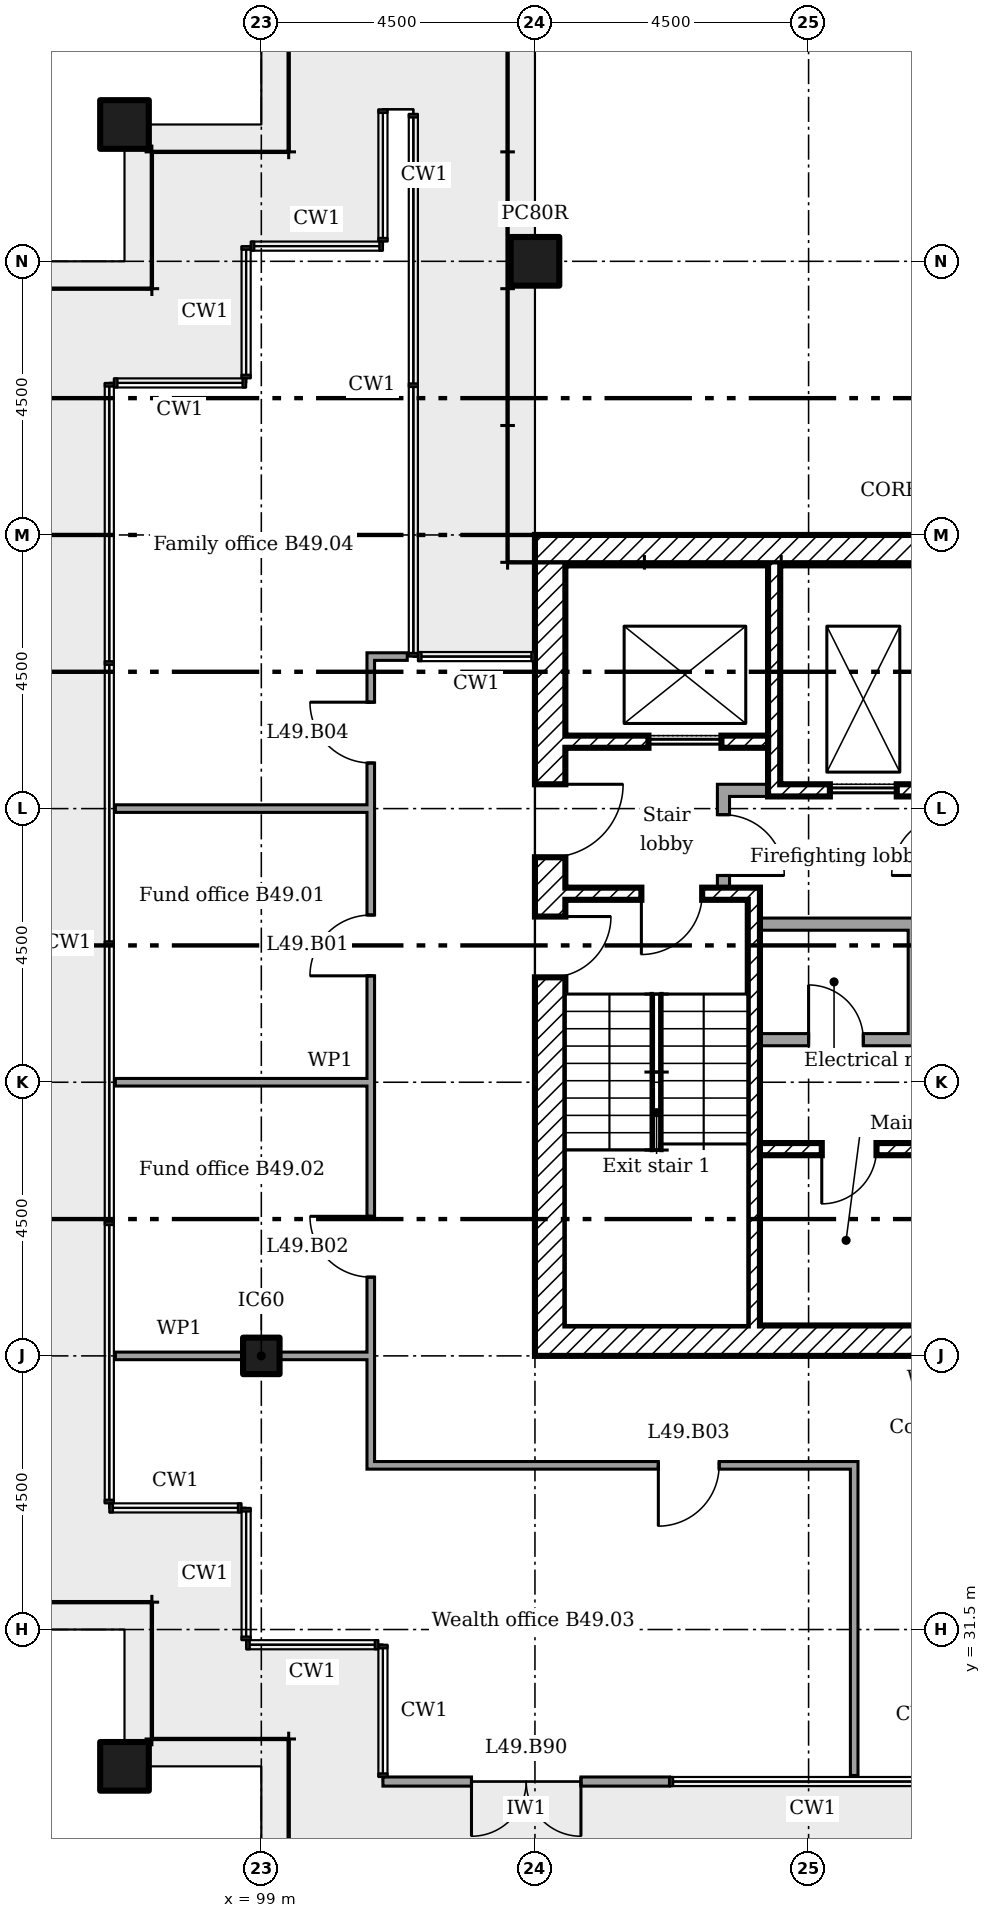
"""IFC4 building model, lengths in metres.
Left out: names, types, materials, properties, quantities, classifications, styles, units other than length and angle.
Written with IfcOpenShell. Run it as: python <this file> out.ifc"""

import sys

from ifc_helpers import new_model, si_unit, direction, frame, frame_2d, origin, origin_2d, place, context, subcontext, project, spatial, rectangle, extrude, element, fill, save


model = new_model("IFC4")
c1 = context("Model", 3, precision=1e-05, world=origin(), true_north=direction((0.0, 1.0)))
c2 = subcontext(c1, "Body", "Model", "MODEL_VIEW")
j1 = project(units=[si_unit("LENGTHUNIT", "METRE"), si_unit("PLANEANGLEUNIT", "RADIAN")], contexts=[c1])
p1 = place(None, origin())
s1 = spatial("IfcSite", under=j1, at=p1, CompositionType="ELEMENT")
p2 = place(p1, origin())
s2 = spatial("IfcBuilding", under=s1, at=p2, CompositionType="ELEMENT")
p3 = place(p2, frame((0.0, 0.0, 195.6)))
s3 = spatial("IfcBuildingStorey", under=s2, at=p3, CompositionType="ELEMENT", Elevation=195.6)
for number, where in (
    (1, (103.5, 54.0, 0.0)),
    (2, (96.75, 56.25, 0.0)),
    (3, (96.75, 29.25, 0.0)),
):
    element("IfcColumn", number, at=place(p3, frame(where)), inside=s3, PredefinedType="COLUMN", context=c2, shape_type="SweptSolid", body=[
        extrude(rectangle(XDim=0.8, YDim=0.8, at=origin_2d()), origin(), (0.0, 0.0, 1.0), 3.6),
    ])
p4 = place(p3, frame((99.0, 36.0, 0.0)))
e4 = element("IfcColumn", 4, at=p4, inside=s3, PredefinedType="COLUMN", context=c2, shape_type="SweptSolid", body=[
    extrude(rectangle(XDim=0.6, YDim=0.6, at=origin_2d()), origin(), (0.0, 0.0, 1.0), 3.6),
])
p5 = place(p3, frame((101.0, 29.0, 0.0)))
e5 = element("IfcWall", 5, at=p5, inside=s3, PredefinedType="SOLIDWALL", context=c2, shape_type="SweptSolid", body=[
    extrude(rectangle(XDim=4.712, YDim=0.15, at=frame_2d((2.356, 0.0))), origin(), (0.0, 0.0, 1.0), 3.1),
])
p6 = place(p5, frame((1.456, 0.0, 0.0)))
e6 = element("IfcOpeningElement", 6, at=p6, cuts=e5, PredefinedType="OPENING", context=c2, shape_type="SweptSolid", body=[
    extrude(rectangle(XDim=1.8, YDim=2.4, at=frame_2d((0.9, 1.2))), frame((0.0, 0.085, 0.0), z_axis=(0.0, -1.0, 0.0), x_axis=(1.0, 0.0, 0.0)), (0.0, 0.0, 1.0), 0.17),
])
for number, where in (
    (7, (103.5, 49.25, 0.0)),
    (8, (103.5, 36.25, 0.0)),
):
    element("IfcWall", number, at=place(p3, frame(where)), inside=s3, PredefinedType="SHEAR", context=c2, shape_type="SweptSolid", body=[
        extrude(rectangle(XDim=13.0, YDim=0.5, at=frame_2d((6.5, 0.0))), origin(), (0.0, 0.0, 1.0), 3.35),
    ])
p7 = place(p3, frame((103.75, 36.5, 0.0), z_axis=(0.0, 0.0, 1.0), x_axis=(0.0, 1.0, 0.0)))
e9 = element("IfcWall", 9, at=p7, inside=s3, PredefinedType="SHEAR", context=c2, shape_type="SweptSolid", body=[
    extrude(rectangle(XDim=12.5, YDim=0.5, at=frame_2d((6.25, 0.0))), origin(), (0.0, 0.0, 1.0), 3.35),
])
p8 = place(p7, frame((7.7, 0.0, 0.0)))
e10 = element("IfcOpeningElement", 10, at=p8, cuts=e9, PredefinedType="OPENING", context=c2, shape_type="SweptSolid", body=[
    extrude(rectangle(XDim=1.2, YDim=2.1, at=frame_2d((0.6, 1.05))), frame((0.0, 0.26, 0.0), z_axis=(0.0, -1.0, 0.0), x_axis=(1.0, 0.0, 0.0)), (0.0, 0.0, 1.0), 0.52),
])
p9 = place(p7, frame((5.725, 0.0, 0.0)))
e11 = element("IfcOpeningElement", 11, at=p9, cuts=e9, PredefinedType="OPENING", context=c2, shape_type="SweptSolid", body=[
    extrude(rectangle(XDim=1.0, YDim=2.1, at=frame_2d((0.5, 1.05))), frame((0.0, 0.26, 0.0), z_axis=(0.0, -1.0, 0.0), x_axis=(1.0, 0.0, 0.0)), (0.0, 0.0, 1.0), 0.52),
])
p10 = place(p3, frame((107.433, 49.0, 0.0), z_axis=(0.0, 0.0, 1.0), x_axis=(0.0, -1.0, 0.0)))
e12 = element("IfcWall", 12, at=p10, inside=s3, PredefinedType="SHEAR", context=c2, shape_type="SweptSolid", body=[
    extrude(rectangle(XDim=3.8, YDim=0.2, at=frame_2d((1.9, 0.0))), origin(), (0.0, 0.0, 1.0), 3.35),
])
p11 = place(p3, frame((106.5, 45.3, 0.0)))
e13 = element("IfcWall", 13, at=p11, inside=s3, PredefinedType="PARTITIONING", context=c2, shape_type="SweptSolid", body=[
    extrude(rectangle(XDim=0.833, YDim=0.2, at=frame_2d((0.417, 0.0))), origin(), (0.0, 0.0, 1.0), 3.35),
])
p12 = place(p3, frame((106.6, 43.7, 0.0), z_axis=(0.0, 0.0, 1.0), x_axis=(0.0, 1.0, 0.0)))
e14 = element("IfcWall", 14, at=p12, inside=s3, PredefinedType="PARTITIONING", context=c2, shape_type="SweptSolid", body=[
    extrude(rectangle(XDim=1.5, YDim=0.2, at=frame_2d((0.75, 0.0))), origin(), (0.0, 0.0, 1.0), 3.35),
])
p13 = place(p12, frame((0.2, 0.0, 0.0)))
e15 = element("IfcOpeningElement", 15, at=p13, cuts=e14, PredefinedType="OPENING", context=c2, shape_type="SweptSolid", body=[
    extrude(rectangle(XDim=1.0, YDim=2.1, at=frame_2d((0.5, 1.05))), frame((0.0, 0.11, 0.0), z_axis=(0.0, -1.0, 0.0), x_axis=(1.0, 0.0, 0.0)), (0.0, 0.0, 1.0), 0.22),
])
p14 = place(p3, frame((104.0, 46.1, 0.0)))
e16 = element("IfcWall", 16, at=p14, inside=s3, PredefinedType="SHEAR", context=c2, shape_type="SweptSolid", body=[
    extrude(rectangle(XDim=3.333, YDim=0.2, at=frame_2d((1.667, 0.0))), origin(), (0.0, 0.0, 1.0), 3.35),
])
p15 = place(p14, frame((1.367, 0.0, 0.0)))
e17 = element("IfcOpeningElement", 17, at=p15, cuts=e16, PredefinedType="OPENING", context=c2, shape_type="SweptSolid", body=[
    extrude(rectangle(XDim=1.2, YDim=2.1, at=frame_2d((0.6, 1.05))), frame((0.0, 0.11, 0.0), z_axis=(0.0, -1.0, 0.0), x_axis=(1.0, 0.0, 0.0)), (0.0, 0.0, 1.0), 0.22),
])
p16 = place(p3, frame((107.533, 45.3, 0.0)))
e18 = element("IfcWall", 18, at=p16, inside=s3, PredefinedType="SHEAR", context=c2, shape_type="SweptSolid", body=[
    extrude(rectangle(XDim=2.733, YDim=0.2, at=frame_2d((1.367, 0.0))), origin(), (0.0, 0.0, 1.0), 3.35),
])
p17 = place(p16, frame((0.817, 0.0, 0.0)))
e19 = element("IfcOpeningElement", 19, at=p17, cuts=e18, PredefinedType="OPENING", context=c2, shape_type="SweptSolid", body=[
    extrude(rectangle(XDim=1.1, YDim=2.1, at=frame_2d((0.55, 1.05))), frame((0.0, 0.11, 0.0), z_axis=(0.0, -1.0, 0.0), x_axis=(1.0, 0.0, 0.0)), (0.0, 0.0, 1.0), 0.22),
])
p18 = place(p3, frame((107.2, 39.4, 0.0)))
e20 = element("IfcWall", 20, at=p18, inside=s3, PredefinedType="SHEAR", context=c2, shape_type="SweptSolid", body=[
    extrude(rectangle(XDim=9.3, YDim=0.2, at=frame_2d((4.65, 0.0))), origin(), (0.0, 0.0, 1.0), 3.35),
])
p19 = place(p18, frame((1.017, 0.0, 0.0)))
e21 = element("IfcOpeningElement", 21, at=p19, cuts=e20, PredefinedType="OPENING", context=c2, shape_type="SweptSolid", body=[
    extrude(rectangle(XDim=0.9, YDim=2.1, at=frame_2d((0.45, 1.05))), frame((0.0, 0.11, 0.0), z_axis=(0.0, -1.0, 0.0), x_axis=(1.0, 0.0, 0.0)), (0.0, 0.0, 1.0), 0.22),
])
p20 = place(p18, frame((3.95, 0.0, 0.0)))
e22 = element("IfcOpeningElement", 22, at=p20, cuts=e20, PredefinedType="OPENING", context=c2, shape_type="SweptSolid", body=[
    extrude(rectangle(XDim=0.9, YDim=2.1, at=frame_2d((0.45, 1.05))), frame((0.0, 0.11, 0.0), z_axis=(0.0, -1.0, 0.0), x_axis=(1.0, 0.0, 0.0)), (0.0, 0.0, 1.0), 0.22),
])
p21 = place(p18, frame((6.883, 0.0, 0.0)))
e23 = element("IfcOpeningElement", 23, at=p21, cuts=e20, PredefinedType="OPENING", context=c2, shape_type="SweptSolid", body=[
    extrude(rectangle(XDim=0.9, YDim=2.1, at=frame_2d((0.45, 1.05))), frame((0.0, 0.11, 0.0), z_axis=(0.0, -1.0, 0.0), x_axis=(1.0, 0.0, 0.0)), (0.0, 0.0, 1.0), 0.22),
])
p22 = place(p3, frame((107.1, 36.5, 0.0), z_axis=(0.0, 0.0, 1.0), x_axis=(0.0, 1.0, 0.0)))
e24 = element("IfcWall", 24, at=p22, inside=s3, PredefinedType="SHEAR", context=c2, shape_type="SweptSolid", body=[
    extrude(rectangle(XDim=7.2, YDim=0.2, at=frame_2d((3.6, 0.0))), origin(), (0.0, 0.0, 1.0), 3.35),
])
p23 = place(p3, frame((104.0, 43.6, 0.0)))
e25 = element("IfcWall", 25, at=p23, inside=s3, PredefinedType="SHEAR", context=c2, shape_type="SweptSolid", body=[
    extrude(rectangle(XDim=3.0, YDim=0.2, at=frame_2d((1.5, 0.0))), origin(), (0.0, 0.0, 1.0), 3.35),
])
p24 = place(p23, frame((1.25, 0.0, 0.0)))
e26 = element("IfcOpeningElement", 26, at=p24, cuts=e25, PredefinedType="OPENING", context=c2, shape_type="SweptSolid", body=[
    extrude(rectangle(XDim=1.0, YDim=2.1, at=frame_2d((0.5, 1.05))), frame((0.0, 0.11, 0.0), z_axis=(0.0, -1.0, 0.0), x_axis=(1.0, 0.0, 0.0)), (0.0, 0.0, 1.0), 0.22),
])
p25 = place(p3, frame((107.2, 43.1, 0.0)))
e27 = element("IfcWall", 27, at=p25, inside=s3, PredefinedType="PARTITIONING", context=c2, shape_type="SweptSolid", body=[
    extrude(rectangle(XDim=6.1, YDim=0.2, at=frame_2d((3.05, 0.0))), origin(), (0.0, 0.0, 1.0), 3.35),
])
p26 = place(p25, frame((4.75, 0.0, 0.0)))
e28 = element("IfcOpeningElement", 28, at=p26, cuts=e27, PredefinedType="OPENING", context=c2, shape_type="SweptSolid", body=[
    extrude(rectangle(XDim=0.9, YDim=2.1, at=frame_2d((0.45, 1.05))), frame((0.0, 0.11, 0.0), z_axis=(0.0, -1.0, 0.0), x_axis=(1.0, 0.0, 0.0)), (0.0, 0.0, 1.0), 0.22),
])
p27 = place(p3, frame((107.2, 41.2, 0.0)))
e29 = element("IfcWall", 29, at=p27, inside=s3, PredefinedType="PARTITIONING", context=c2, shape_type="SweptSolid", body=[
    extrude(rectangle(XDim=6.1, YDim=0.2, at=frame_2d((3.05, 0.0))), origin(), (0.0, 0.0, 1.0), 3.35),
])
p28 = place(p27, frame((0.8, 0.0, 0.0)))
e30 = element("IfcOpeningElement", 30, at=p28, cuts=e29, PredefinedType="OPENING", context=c2, shape_type="SweptSolid", body=[
    extrude(rectangle(XDim=0.9, YDim=2.1, at=frame_2d((0.45, 1.05))), frame((0.0, 0.11, 0.0), z_axis=(0.0, -1.0, 0.0), x_axis=(1.0, 0.0, 0.0)), (0.0, 0.0, 1.0), 0.22),
])
p29 = place(p27, frame((2.95, 0.0, 0.0)))
e31 = element("IfcOpeningElement", 31, at=p29, cuts=e29, PredefinedType="OPENING", context=c2, shape_type="SweptSolid", body=[
    extrude(rectangle(XDim=0.9, YDim=2.1, at=frame_2d((0.45, 1.05))), frame((0.0, 0.11, 0.0), z_axis=(0.0, -1.0, 0.0), x_axis=(1.0, 0.0, 0.0)), (0.0, 0.0, 1.0), 0.22),
])
p30 = place(p3, frame((109.7, 41.3, 0.0), z_axis=(0.0, 0.0, 1.0), x_axis=(0.0, 1.0, 0.0)))
e32 = element("IfcWall", 32, at=p30, inside=s3, PredefinedType="PARTITIONING", context=c2, shape_type="SweptSolid", body=[
    extrude(rectangle(XDim=1.7, YDim=0.125, at=frame_2d((0.85, 0.0))), origin(), (0.0, 0.0, 1.0), 3.35),
])
p31 = place(p3, frame((100.738, 34.2, 0.0)))
e33 = element("IfcWall", 33, at=p31, inside=s3, PredefinedType="PARTITIONING", context=c2, shape_type="SweptSolid", body=[
    extrude(rectangle(XDim=8.075, YDim=0.125, at=frame_2d((4.038, 0.0))), origin(), (0.0, 0.0, 1.0), 3.45),
])
p32 = place(p31, frame((4.792, 0.0, 0.0)))
e34 = element("IfcOpeningElement", 34, at=p32, cuts=e33, PredefinedType="OPENING", context=c2, shape_type="SweptSolid", body=[
    extrude(rectangle(XDim=1.0, YDim=2.1, at=frame_2d((0.5, 1.05))), frame((0.0, 0.073, 0.0), z_axis=(0.0, -1.0, 0.0), x_axis=(1.0, 0.0, 0.0)), (0.0, 0.0, 1.0), 0.145),
])
p33 = place(p3, frame((96.6, 36.0, 0.0)))
e35 = element("IfcWall", 35, at=p33, inside=s3, PredefinedType="PARTITIONING", context=c2, shape_type="SweptSolid", body=[
    extrude(rectangle(XDim=2.1, YDim=0.125, at=frame_2d((1.05, 0.0))), origin(), (0.0, 0.0, 1.0), 2.842),
])
p34 = place(p3, frame((99.3, 36.0, 0.0)))
e36 = element("IfcWall", 36, at=p34, inside=s3, PredefinedType="PARTITIONING", context=c2, shape_type="SweptSolid", body=[
    extrude(rectangle(XDim=1.5, YDim=0.125, at=frame_2d((0.75, 0.0))), origin(), (0.0, 0.0, 1.0), 2.842),
])
for number, where in (
    (37, (96.6, 40.5, 0.0)),
    (38, (96.6, 45.0, 0.0)),
):
    element("IfcWall", number, at=place(p3, frame(where)), inside=s3, PredefinedType="PARTITIONING", context=c2, shape_type="SweptSolid", body=[
        extrude(rectangle(XDim=4.2, YDim=0.125, at=frame_2d((2.1, 0.0))), origin(), (0.0, 0.0, 1.0), 2.851),
    ])
p35 = place(p3, frame((100.738, 47.5, 0.0)))
e39 = element("IfcWall", 39, at=p35, inside=s3, PredefinedType="PARTITIONING", context=c2, shape_type="SweptSolid", body=[
    extrude(rectangle(XDim=0.662, YDim=0.125, at=frame_2d((0.331, 0.0))), origin(), (0.0, 0.0, 1.0), 3.45),
])
p36 = place(p3, frame((100.8, 34.262, 0.0), z_axis=(0.0, 0.0, 1.0), x_axis=(0.0, 1.0, 0.0)))
e40 = element("IfcWall", 40, at=p36, inside=s3, PredefinedType="PARTITIONING", context=c2, shape_type="SweptSolid", body=[
    extrude(rectangle(XDim=13.175, YDim=0.125, at=frame_2d((6.587, 0.0))), origin(), (0.0, 0.0, 1.0), 3.45),
])
p37 = place(p36, frame((7.988, 0.0, 0.0)))
e41 = element("IfcOpeningElement", 41, at=p37, cuts=e40, PredefinedType="OPENING", context=c2, shape_type="SweptSolid", body=[
    extrude(rectangle(XDim=1.0, YDim=2.1, at=frame_2d((0.5, 1.05))), frame((0.0, 0.073, 0.0), z_axis=(0.0, -1.0, 0.0), x_axis=(1.0, 0.0, 0.0)), (0.0, 0.0, 1.0), 0.145),
])
p38 = place(p36, frame((3.032, 0.0, 0.0)))
e42 = element("IfcOpeningElement", 42, at=p38, cuts=e40, PredefinedType="OPENING", context=c2, shape_type="SweptSolid", body=[
    extrude(rectangle(XDim=1.0, YDim=2.1, at=frame_2d((0.5, 1.05))), frame((0.0, 0.073, 0.0), z_axis=(0.0, -1.0, 0.0), x_axis=(1.0, 0.0, 0.0)), (0.0, 0.0, 1.0), 0.145),
])
p39 = place(p36, frame((11.488, 0.0, 0.0)))
e43 = element("IfcOpeningElement", 43, at=p39, cuts=e40, PredefinedType="OPENING", context=c2, shape_type="SweptSolid", body=[
    extrude(rectangle(XDim=1.0, YDim=2.1, at=frame_2d((0.5, 1.05))), frame((0.0, 0.073, 0.0), z_axis=(0.0, -1.0, 0.0), x_axis=(1.0, 0.0, 0.0)), (0.0, 0.0, 1.0), 0.145),
])
p40 = place(p3, frame((108.75, 29.1, 0.0), z_axis=(0.0, 0.0, 1.0), x_axis=(0.0, 1.0, 0.0)))
e44 = element("IfcWall", 44, at=p40, inside=s3, PredefinedType="PARTITIONING", context=c2, shape_type="SweptSolid", body=[
    extrude(rectangle(XDim=5.037, YDim=0.125, at=frame_2d((2.519, 0.0))), origin(), (0.0, 0.0, 1.0), 3.45),
])
p41 = place(p6, frame((1.8, 0.0, 0.0), x_axis=(-1.0, 0.0, 0.0)))
e45 = element("IfcDoor", 45, at=p41, inside=s3, OperationType="DOUBLE_DOOR_DOUBLE_SWING", PredefinedType="NOTDEFINED", context=c2, shape_type="SweptSolid", body=[
    extrude(rectangle(XDim=1.8, YDim=2.4, at=frame_2d((0.9, 1.2))), frame((0.0, 0.025, 0.0), z_axis=(0.0, -1.0, 0.0), x_axis=(1.0, 0.0, 0.0)), (0.0, 0.0, 1.0), 0.05),
])
fill(e6, e45)
p42 = place(p8, frame((1.2, 0.0, 0.0), x_axis=(-1.0, 0.0, 0.0)))
e46 = element("IfcDoor", 46, at=p42, inside=s3, OperationType="SINGLE_SWING_RIGHT", PredefinedType="DOOR", context=c2, shape_type="SweptSolid", body=[
    extrude(rectangle(XDim=1.2, YDim=2.1, at=frame_2d((0.6, 1.05))), frame((0.0, 0.025, 0.0), z_axis=(0.0, -1.0, 0.0), x_axis=(1.0, 0.0, 0.0)), (0.0, 0.0, 1.0), 0.05),
])
fill(e10, e46)
p43 = place(p24, frame((1.0, 0.0, 0.0), x_axis=(-1.0, 0.0, 0.0)))
e47 = element("IfcDoor", 47, at=p43, inside=s3, OperationType="SINGLE_SWING_LEFT", PredefinedType="DOOR", context=c2, shape_type="SweptSolid", body=[
    extrude(rectangle(XDim=1.0, YDim=2.1, at=frame_2d((0.5, 1.05))), frame((0.0, 0.025, 0.0), z_axis=(0.0, -1.0, 0.0), x_axis=(1.0, 0.0, 0.0)), (0.0, 0.0, 1.0), 0.05),
])
fill(e26, e47)
p44 = place(p9, frame((1.0, 0.0, 0.0), x_axis=(-1.0, 0.0, 0.0)))
e48 = element("IfcDoor", 48, at=p44, inside=s3, OperationType="SINGLE_SWING_RIGHT", PredefinedType="DOOR", context=c2, shape_type="SweptSolid", body=[
    extrude(rectangle(XDim=1.0, YDim=2.1, at=frame_2d((0.5, 1.05))), frame((0.0, 0.025, 0.0), z_axis=(0.0, -1.0, 0.0), x_axis=(1.0, 0.0, 0.0)), (0.0, 0.0, 1.0), 0.05),
])
fill(e11, e48)
p45 = place(p13, frame((1.0, 0.0, 0.0), x_axis=(-1.0, 0.0, 0.0)))
e49 = element("IfcDoor", 49, at=p45, inside=s3, OperationType="SINGLE_SWING_LEFT", PredefinedType="DOOR", context=c2, shape_type="SweptSolid", body=[
    extrude(rectangle(XDim=1.0, YDim=2.1, at=frame_2d((0.5, 1.05))), frame((0.0, 0.025, 0.0), z_axis=(0.0, -1.0, 0.0), x_axis=(1.0, 0.0, 0.0)), (0.0, 0.0, 1.0), 0.05),
])
fill(e15, e49)
p46 = place(p19, frame((0.9, 0.0, 0.0), x_axis=(-1.0, 0.0, 0.0)))
e50 = element("IfcDoor", 50, at=p46, inside=s3, OperationType="SINGLE_SWING_LEFT", PredefinedType="DOOR", context=c2, shape_type="SweptSolid", body=[
    extrude(rectangle(XDim=0.9, YDim=2.1, at=frame_2d((0.45, 1.05))), frame((0.0, 0.025, 0.0), z_axis=(0.0, -1.0, 0.0), x_axis=(1.0, 0.0, 0.0)), (0.0, 0.0, 1.0), 0.05),
])
fill(e21, e50)
p47 = place(p28, origin())
e51 = element("IfcDoor", 51, at=p47, inside=s3, OperationType="SINGLE_SWING_RIGHT", PredefinedType="DOOR", context=c2, shape_type="SweptSolid", body=[
    extrude(rectangle(XDim=0.9, YDim=2.1, at=frame_2d((0.45, 1.05))), frame((0.0, 0.025, 0.0), z_axis=(0.0, -1.0, 0.0), x_axis=(1.0, 0.0, 0.0)), (0.0, 0.0, 1.0), 0.05),
])
fill(e30, e51)
p48 = place(p17, origin())
e52 = element("IfcDoor", 52, at=p48, inside=s3, OperationType="SLIDING_TO_LEFT", PredefinedType="DOOR", context=c2, shape_type="SweptSolid", body=[
    extrude(rectangle(XDim=1.1, YDim=2.1, at=frame_2d((0.55, 1.05))), frame((0.0, 0.025, 0.0), z_axis=(0.0, -1.0, 0.0), x_axis=(1.0, 0.0, 0.0)), (0.0, 0.0, 1.0), 0.05),
])
fill(e19, e52)
p49 = place(p15, origin())
e53 = element("IfcDoor", 53, at=p49, inside=s3, OperationType="SLIDING_TO_LEFT", PredefinedType="DOOR", context=c2, shape_type="SweptSolid", body=[
    extrude(rectangle(XDim=1.2, YDim=2.1, at=frame_2d((0.6, 1.05))), frame((0.0, 0.025, 0.0), z_axis=(0.0, -1.0, 0.0), x_axis=(1.0, 0.0, 0.0)), (0.0, 0.0, 1.0), 0.05),
])
fill(e17, e53)
p50 = place(p37, origin())
e54 = element("IfcDoor", 54, at=p50, inside=s3, OperationType="SINGLE_SWING_RIGHT", PredefinedType="DOOR", context=c2, shape_type="SweptSolid", body=[
    extrude(rectangle(XDim=1.0, YDim=2.1, at=frame_2d((0.5, 1.05))), frame((0.0, 0.025, 0.0), z_axis=(0.0, -1.0, 0.0), x_axis=(1.0, 0.0, 0.0)), (0.0, 0.0, 1.0), 0.05),
])
fill(e41, e54)
p51 = place(p38, origin())
e55 = element("IfcDoor", 55, at=p51, inside=s3, OperationType="SINGLE_SWING_LEFT", PredefinedType="DOOR", context=c2, shape_type="SweptSolid", body=[
    extrude(rectangle(XDim=1.0, YDim=2.1, at=frame_2d((0.5, 1.05))), frame((0.0, 0.025, 0.0), z_axis=(0.0, -1.0, 0.0), x_axis=(1.0, 0.0, 0.0)), (0.0, 0.0, 1.0), 0.05),
])
fill(e42, e55)
p52 = place(p32, frame((1.0, 0.0, 0.0), x_axis=(-1.0, 0.0, 0.0)))
e56 = element("IfcDoor", 56, at=p52, inside=s3, OperationType="SINGLE_SWING_LEFT", PredefinedType="DOOR", context=c2, shape_type="SweptSolid", body=[
    extrude(rectangle(XDim=1.0, YDim=2.1, at=frame_2d((0.5, 1.05))), frame((0.0, 0.025, 0.0), z_axis=(0.0, -1.0, 0.0), x_axis=(1.0, 0.0, 0.0)), (0.0, 0.0, 1.0), 0.05),
])
fill(e34, e56)
p53 = place(p39, origin())
e57 = element("IfcDoor", 57, at=p53, inside=s3, OperationType="SINGLE_SWING_LEFT", PredefinedType="DOOR", context=c2, shape_type="SweptSolid", body=[
    extrude(rectangle(XDim=1.0, YDim=2.1, at=frame_2d((0.5, 1.05))), frame((0.0, 0.025, 0.0), z_axis=(0.0, -1.0, 0.0), x_axis=(1.0, 0.0, 0.0)), (0.0, 0.0, 1.0), 0.05),
])
fill(e43, e57)
save(model, sys.argv[1])
